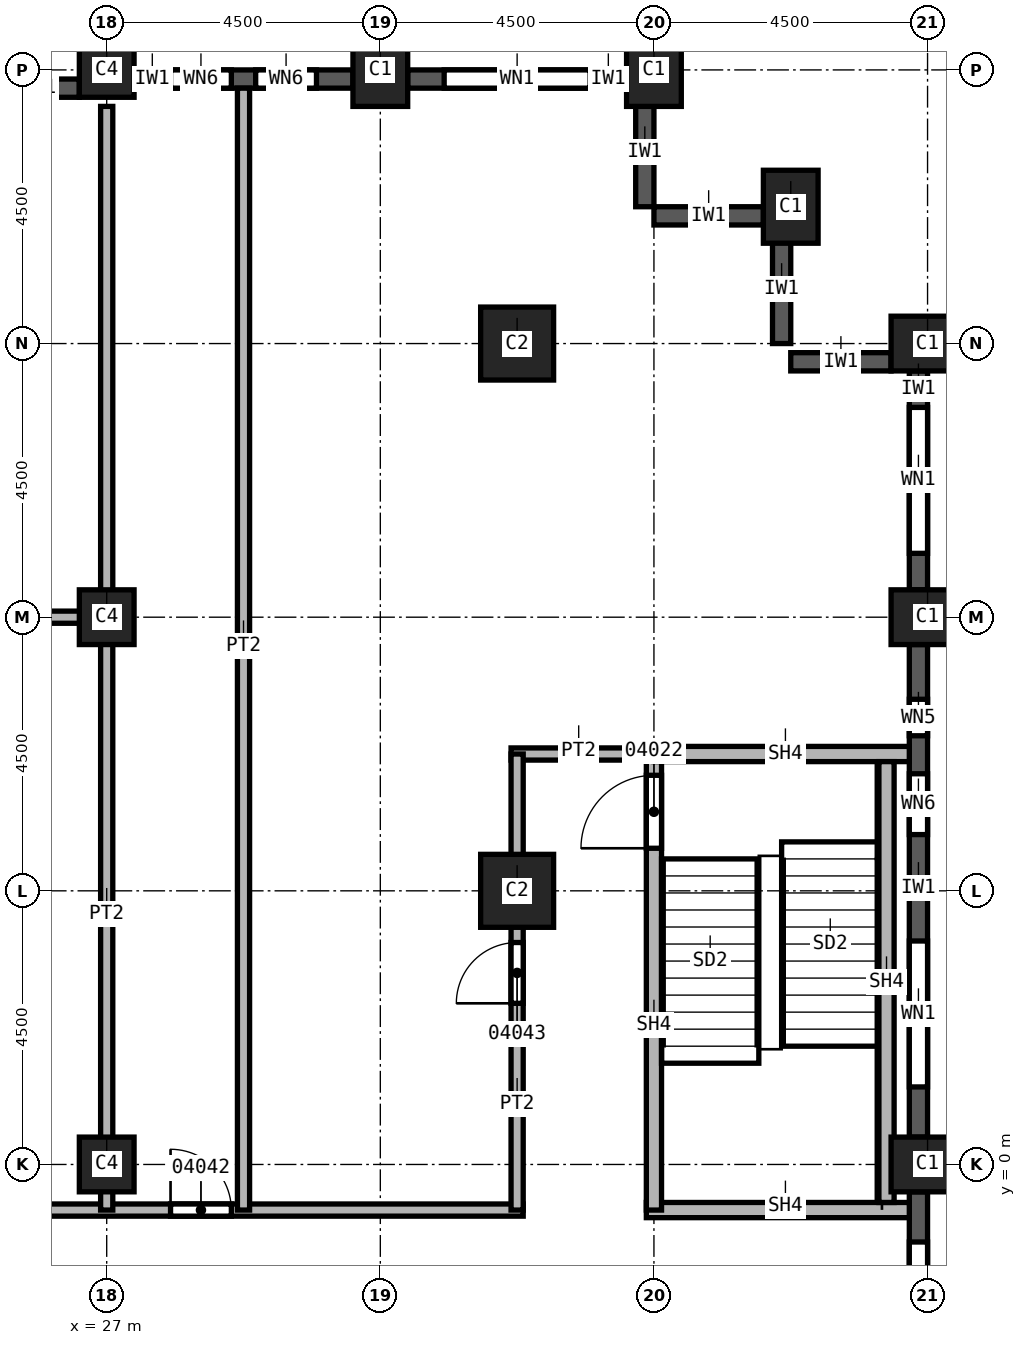
"""IFC4 building model, lengths in metres.
Left out: names, types, materials, properties, quantities, classifications, styles, units other than length and angle.
Written with IfcOpenShell. Run it as: python <this file> out.ifc"""

import sys

from ifc_helpers import new_model, si_unit, direction, frame, frame_2d, origin, origin_2d, place, context, subcontext, project, spatial, rectangle, extrude, element, fill, save


model = new_model("IFC4")
c1 = context("Model", 3, precision=1e-05, world=origin(), true_north=direction((0.0, 1.0)))
c2 = subcontext(c1, "Body", "Model", "MODEL_VIEW")
j1 = project(units=[si_unit("LENGTHUNIT", "METRE"), si_unit("PLANEANGLEUNIT", "RADIAN")], contexts=[c1])
p1 = place(None, origin())
s1 = spatial("IfcSite", under=j1, at=p1, CompositionType="ELEMENT")
p2 = place(p1, origin())
s2 = spatial("IfcBuilding", under=s1, at=p2, CompositionType="ELEMENT")
p3 = place(p2, frame((0.0, 0.0, 104.0)))
s3 = spatial("IfcBuildingStorey", under=s2, at=p3, CompositionType="ELEMENT", Elevation=104.0)
for number, where, z_axis, x_axis in (
    (1, (40.5, 0.0, 0.0), (0.0, 0.0, 1.0), (0.0, 1.0, 0.0)),
    (2, (40.5, 9.0, 0.0), (0.0, 0.0, 1.0), (0.0, 1.0, 0.0)),
    (3, (40.5, 13.5, 0.0), (0.0, 0.0, 1.0), (0.0, 1.0, 0.0)),
    (4, (38.25, 15.75, 0.0), (0.0, 0.0, 1.0), (1.0, 0.0, 0.0)),
    (5, (31.5, 18.0, 0.0), (0.0, 0.0, 1.0), (1.0, 0.0, 0.0)),
    (6, (36.0, 18.0, 0.0), (0.0, 0.0, 1.0), (1.0, 0.0, 0.0)),
):
    element("IfcColumn", number, at=place(p3, frame(where, z_axis=z_axis, x_axis=x_axis)), inside=s3, PredefinedType="COLUMN", context=c2, shape_type="SweptSolid", body=[
        extrude(rectangle(XDim=0.9, YDim=1.2, at=origin_2d()), origin(), (0.0, 0.0, 1.0), 3.7),
    ])
for number, where, z_axis, x_axis in (
    (7, (33.75, 4.5, 0.0), (0.0, 0.0, 1.0), (1.0, 0.0, 0.0)),
    (8, (33.75, 13.5, 0.0), (0.0, 0.0, 1.0), (1.0, 0.0, 0.0)),
):
    element("IfcColumn", number, at=place(p3, frame(where, z_axis=z_axis, x_axis=x_axis)), inside=s3, PredefinedType="COLUMN", context=c2, shape_type="SweptSolid", body=[
        extrude(rectangle(XDim=1.2, YDim=1.2, at=origin_2d()), origin(), (0.0, 0.0, 1.0), 3.7),
    ])
for number, where, z_axis, x_axis in (
    (9, (27.0, 0.0, 0.0), (0.0, 0.0, 1.0), (1.0, 0.0, 0.0)),
    (10, (27.0, 9.0, 0.0), (0.0, 0.0, 1.0), (1.0, 0.0, 0.0)),
    (11, (27.0, 18.0, 0.0), (0.0, 0.0, 1.0), (1.0, 0.0, 0.0)),
):
    element("IfcColumn", number, at=place(p3, frame(where, z_axis=z_axis, x_axis=x_axis)), inside=s3, PredefinedType="COLUMN", context=c2, shape_type="SweptSolid", body=[
        extrude(rectangle(XDim=0.9, YDim=0.9, at=origin_2d()), origin(), (0.0, 0.0, 1.0), 3.7),
    ])
p4 = place(p3, frame((39.9, 13.2, 0.0), z_axis=(0.0, 0.0, 1.0), x_axis=(-1.0, 0.0, 0.0)))
e12 = element("IfcWall", 12, at=p4, inside=s3, PredefinedType="SOLIDWALL", context=c2, shape_type="SweptSolid", body=[
    extrude(rectangle(XDim=1.65, YDim=0.3, at=frame_2d((0.825, 0.0))), origin(), (0.0, 0.0, 1.0), 3.1),
])
for number, where, z_axis, x_axis in (
    (13, (38.1, 15.3, 0.0), (0.0, 0.0, 1.0), (0.0, -1.0, 0.0)),
    (14, (37.8, 15.6, 0.0), (0.0, 0.0, 1.0), (-1.0, 0.0, 0.0)),
    (15, (35.85, 17.55, 0.0), (0.0, 0.0, 1.0), (0.0, -1.0, 0.0)),
):
    element("IfcWall", number, at=place(p3, frame(where, z_axis=z_axis, x_axis=x_axis)), inside=s3, PredefinedType="SOLIDWALL", context=c2, shape_type="SweptSolid", body=[
        extrude(rectangle(XDim=1.8, YDim=0.3, at=frame_2d((0.9, 0.0))), origin(), (0.0, 0.0, 1.0), 3.1),
    ])
p5 = place(p3, frame((40.35, -8.55, 0.0), z_axis=(0.0, 0.0, 1.0), x_axis=(0.0, 1.0, 0.0)))
e16 = element("IfcWall", 16, at=p5, inside=s3, PredefinedType="SOLIDWALL", context=c2, shape_type="SweptSolid", body=[
    extrude(rectangle(XDim=8.1, YDim=0.3, at=frame_2d((4.05, 0.0))), origin(), (0.0, 0.0, 1.0), 3.1),
])
p6 = place(p5, frame((0.825, 0.0, 0.8)))
e17 = element("IfcOpeningElement", 17, at=p6, cuts=e16, PredefinedType="OPENING", context=c2, shape_type="SweptSolid", body=[
    extrude(rectangle(XDim=2.4, YDim=1.95, at=frame_2d((1.2, 0.975))), frame((0.0, 0.15, 0.0), z_axis=(0.0, -1.0, 0.0), x_axis=(1.0, 0.0, 0.0)), (0.0, 0.0, 1.0), 0.3),
])
p7 = place(p5, frame((4.875, 0.0, 0.8)))
e18 = element("IfcOpeningElement", 18, at=p7, cuts=e16, PredefinedType="OPENING", context=c2, shape_type="SweptSolid", body=[
    extrude(rectangle(XDim=2.4, YDim=1.95, at=frame_2d((1.2, 0.975))), frame((0.0, 0.15, 0.0), z_axis=(0.0, -1.0, 0.0), x_axis=(1.0, 0.0, 0.0)), (0.0, 0.0, 1.0), 0.3),
])
p8 = place(p3, frame((40.35, 0.45, 0.0), z_axis=(0.0, 0.0, 1.0), x_axis=(0.0, 1.0, 0.0)))
e19 = element("IfcWall", 19, at=p8, inside=s3, PredefinedType="SOLIDWALL", context=c2, shape_type="SweptSolid", body=[
    extrude(rectangle(XDim=8.1, YDim=0.3, at=frame_2d((4.05, 0.0))), origin(), (0.0, 0.0, 1.0), 3.1),
])
p9 = place(p8, frame((0.825, 0.0, 0.8)))
e20 = element("IfcOpeningElement", 20, at=p9, cuts=e19, PredefinedType="OPENING", context=c2, shape_type="SweptSolid", body=[
    extrude(rectangle(XDim=2.4, YDim=1.95, at=frame_2d((1.2, 0.975))), frame((0.0, 0.15, 0.0), z_axis=(0.0, -1.0, 0.0), x_axis=(1.0, 0.0, 0.0)), (0.0, 0.0, 1.0), 0.3),
])
p10 = place(p8, frame((4.975, 0.0, 0.8)))
e21 = element("IfcOpeningElement", 21, at=p10, cuts=e19, PredefinedType="OPENING", context=c2, shape_type="SweptSolid", body=[
    extrude(rectangle(XDim=1.0, YDim=1.95, at=frame_2d((0.5, 0.975))), frame((0.0, 0.15, 0.0), z_axis=(0.0, -1.0, 0.0), x_axis=(1.0, 0.0, 0.0)), (0.0, 0.0, 1.0), 0.3),
])
p11 = place(p8, frame((6.6, 0.0, 0.8)))
e22 = element("IfcOpeningElement", 22, at=p11, cuts=e19, PredefinedType="OPENING", context=c2, shape_type="SweptSolid", body=[
    extrude(rectangle(XDim=0.6, YDim=1.95, at=frame_2d((0.3, 0.975))), frame((0.0, 0.15, 0.0), z_axis=(0.0, -1.0, 0.0), x_axis=(1.0, 0.0, 0.0)), (0.0, 0.0, 1.0), 0.3),
])
p12 = place(p3, frame((40.35, 9.45, 0.0), z_axis=(0.0, 0.0, 1.0), x_axis=(0.0, 1.0, 0.0)))
e23 = element("IfcWall", 23, at=p12, inside=s3, PredefinedType="SOLIDWALL", context=c2, shape_type="SweptSolid", body=[
    extrude(rectangle(XDim=3.6, YDim=0.3, at=frame_2d((1.8, 0.0))), origin(), (0.0, 0.0, 1.0), 3.1),
])
p13 = place(p12, frame((0.6, 0.0, 0.8)))
e24 = element("IfcOpeningElement", 24, at=p13, cuts=e23, PredefinedType="OPENING", context=c2, shape_type="SweptSolid", body=[
    extrude(rectangle(XDim=2.4, YDim=1.95, at=frame_2d((1.2, 0.975))), frame((0.0, 0.15, 0.0), z_axis=(0.0, -1.0, 0.0), x_axis=(1.0, 0.0, 0.0)), (0.0, 0.0, 1.0), 0.3),
])
p14 = place(p3, frame((35.55, 17.85, 0.0), z_axis=(0.0, 0.0, 1.0), x_axis=(-1.0, 0.0, 0.0)))
e25 = element("IfcWall", 25, at=p14, inside=s3, PredefinedType="SOLIDWALL", context=c2, shape_type="SweptSolid", body=[
    extrude(rectangle(XDim=3.6, YDim=0.3, at=frame_2d((1.8, 0.0))), origin(), (0.0, 0.0, 1.0), 3.1),
])
p15 = place(p14, frame((0.6, 0.0, 0.8)))
e26 = element("IfcOpeningElement", 26, at=p15, cuts=e25, PredefinedType="OPENING", context=c2, shape_type="SweptSolid", body=[
    extrude(rectangle(XDim=2.4, YDim=1.95, at=frame_2d((1.2, 0.975))), frame((0.0, 0.15, 0.0), z_axis=(0.0, -1.0, 0.0), x_axis=(1.0, 0.0, 0.0)), (0.0, 0.0, 1.0), 0.3),
])
p16 = place(p3, frame((31.05, 17.85, 0.0), z_axis=(0.0, 0.0, 1.0), x_axis=(-1.0, 0.0, 0.0)))
e27 = element("IfcWall", 27, at=p16, inside=s3, PredefinedType="SOLIDWALL", context=c2, shape_type="SweptSolid", body=[
    extrude(rectangle(XDim=3.6, YDim=0.3, at=frame_2d((1.8, 0.0))), origin(), (0.0, 0.0, 1.0), 3.1),
])
p17 = place(p16, frame((0.6, 0.0, 0.8)))
e28 = element("IfcOpeningElement", 28, at=p17, cuts=e27, PredefinedType="OPENING", context=c2, shape_type="SweptSolid", body=[
    extrude(rectangle(XDim=1.0, YDim=1.95, at=frame_2d((0.5, 0.975))), frame((0.0, 0.15, 0.0), z_axis=(0.0, -1.0, 0.0), x_axis=(1.0, 0.0, 0.0)), (0.0, 0.0, 1.0), 0.3),
])
p18 = place(p16, frame((2.0, 0.0, 0.8)))
e29 = element("IfcOpeningElement", 29, at=p18, cuts=e27, PredefinedType="OPENING", context=c2, shape_type="SweptSolid", body=[
    extrude(rectangle(XDim=1.0, YDim=1.95, at=frame_2d((0.5, 0.975))), frame((0.0, 0.15, 0.0), z_axis=(0.0, -1.0, 0.0), x_axis=(1.0, 0.0, 0.0)), (0.0, 0.0, 1.0), 0.3),
])
p19 = place(p3, frame((26.55, 17.7, 0.0), z_axis=(0.0, 0.0, 1.0), x_axis=(-1.0, 0.0, 0.0)))
e30 = element("IfcWall", 30, at=p19, inside=s3, PredefinedType="SOLIDWALL", context=c2, shape_type="SweptSolid", body=[
    extrude(rectangle(XDim=1.35, YDim=0.3, at=frame_2d((0.675, 0.0))), origin(), (0.0, 0.0, 1.0), 3.1),
])
p20 = place(p3, frame((15.4, -0.75, 0.0), z_axis=(0.0, 0.0, 1.0), x_axis=(1.0, 0.0, 0.0)))
e31 = element("IfcWall", 31, at=p20, inside=s3, PredefinedType="PARTITIONING", context=c2, shape_type="SweptSolid", body=[
    extrude(rectangle(XDim=18.45, YDim=0.2, at=frame_2d((9.225, 0.0))), origin(), (0.0, 0.0, 1.0), 3.7),
])
p21 = place(p20, frame((3.55, 0.0, 0.0)))
e32 = element("IfcOpeningElement", 32, at=p21, cuts=e31, PredefinedType="OPENING", context=c2, shape_type="SweptSolid", body=[
    extrude(rectangle(XDim=1.0, YDim=2.1, at=frame_2d((0.5, 1.05))), frame((0.0, 0.1, 0.0), z_axis=(0.0, -1.0, 0.0), x_axis=(1.0, 0.0, 0.0)), (0.0, 0.0, 1.0), 0.2),
])
p22 = place(p20, frame((12.65, 0.0, 0.0)))
e33 = element("IfcOpeningElement", 33, at=p22, cuts=e31, PredefinedType="OPENING", context=c2, shape_type="SweptSolid", body=[
    extrude(rectangle(XDim=1.0, YDim=2.1, at=frame_2d((0.5, 1.05))), frame((0.0, 0.1, 0.0), z_axis=(0.0, -1.0, 0.0), x_axis=(1.0, 0.0, 0.0)), (0.0, 0.0, 1.0), 0.2),
])
p23 = place(p3, frame((15.4, 9.0, 0.0), z_axis=(0.0, 0.0, 1.0), x_axis=(1.0, 0.0, 0.0)))
e34 = element("IfcWall", 34, at=p23, inside=s3, PredefinedType="PARTITIONING", context=c2, shape_type="SweptSolid", body=[
    extrude(rectangle(XDim=11.7, YDim=0.2, at=frame_2d((5.85, 0.0))), origin(), (0.0, 0.0, 1.0), 3.7),
])
p24 = place(p3, frame((27.0, 17.4, 0.0), z_axis=(0.0, 0.0, 1.0), x_axis=(0.0, -1.0, 0.0)))
e35 = element("IfcWall", 35, at=p24, inside=s3, PredefinedType="PARTITIONING", context=c2, shape_type="SweptSolid", body=[
    extrude(rectangle(XDim=18.15, YDim=0.2, at=frame_2d((9.075, 0.0))), origin(), (0.0, 0.0, 1.0), 3.7),
])
p25 = place(p3, frame((29.25, 17.7, 0.0), z_axis=(0.0, 0.0, 1.0), x_axis=(0.0, -1.0, 0.0)))
e36 = element("IfcWall", 36, at=p25, inside=s3, PredefinedType="PARTITIONING", context=c2, shape_type="SweptSolid", body=[
    extrude(rectangle(XDim=18.45, YDim=0.2, at=frame_2d((9.225, 0.0))), origin(), (0.0, 0.0, 1.0), 3.7),
])
p26 = place(p3, frame((33.65, 6.75, 0.0), z_axis=(0.0, 0.0, 1.0), x_axis=(1.0, 0.0, 0.0)))
e37 = element("IfcWall", 37, at=p26, inside=s3, PredefinedType="PARTITIONING", context=c2, shape_type="SweptSolid", body=[
    extrude(rectangle(XDim=2.35, YDim=0.2, at=frame_2d((1.175, 0.0))), origin(), (0.0, 0.0, 1.0), 3.7),
])
p27 = place(p3, frame((33.75, -0.75, 0.0), z_axis=(0.0, 0.0, 1.0), x_axis=(0.0, 1.0, 0.0)))
e38 = element("IfcWall", 38, at=p27, inside=s3, PredefinedType="PARTITIONING", context=c2, shape_type="SweptSolid", body=[
    extrude(rectangle(XDim=7.5, YDim=0.2, at=frame_2d((3.75, 0.0))), origin(), (0.0, 0.0, 1.0), 3.7),
])
p28 = place(p27, frame((3.4, 0.0, 0.0)))
e39 = element("IfcOpeningElement", 39, at=p28, cuts=e38, PredefinedType="OPENING", context=c2, shape_type="SweptSolid", body=[
    extrude(rectangle(XDim=1.0, YDim=2.1, at=frame_2d((0.5, 1.05))), frame((0.0, 0.1, 0.0), z_axis=(0.0, -1.0, 0.0), x_axis=(1.0, 0.0, 0.0)), (0.0, 0.0, 1.0), 0.2),
])
p29 = place(p3, frame((35.875, -0.75, 0.0), z_axis=(0.0, 0.0, 1.0), x_axis=(1.0, 0.0, 0.0)))
e40 = element("IfcWall", 40, at=p29, inside=s3, PredefinedType="SOLIDWALL", context=c2, shape_type="SweptSolid", body=[
    extrude(rectangle(XDim=4.325, YDim=0.25, at=frame_2d((2.163, 0.0))), origin(), (0.0, 0.0, 1.0), 3.7),
])
p30 = place(p3, frame((36.0, -0.75, 0.0), z_axis=(0.0, 0.0, 1.0), x_axis=(0.0, 1.0, 0.0)))
e41 = element("IfcWall", 41, at=p30, inside=s3, PredefinedType="SOLIDWALL", context=c2, shape_type="SweptSolid", body=[
    extrude(rectangle(XDim=7.625, YDim=0.25, at=frame_2d((3.812, 0.0))), origin(), (0.0, 0.0, 1.0), 3.7),
])
p31 = place(p30, frame((5.95, 0.0, 0.0)))
e42 = element("IfcOpeningElement", 42, at=p31, cuts=e41, PredefinedType="OPENING", context=c2, shape_type="SweptSolid", body=[
    extrude(rectangle(XDim=1.2, YDim=2.1, at=frame_2d((0.6, 1.05))), frame((0.0, 0.125, 0.0), z_axis=(0.0, -1.0, 0.0), x_axis=(1.0, 0.0, 0.0)), (0.0, 0.0, 1.0), 0.25),
])
p32 = place(p3, frame((36.0, 6.75, 0.0), z_axis=(0.0, 0.0, 1.0), x_axis=(1.0, 0.0, 0.0)))
e43 = element("IfcWall", 43, at=p32, inside=s3, PredefinedType="SOLIDWALL", context=c2, shape_type="SweptSolid", body=[
    extrude(rectangle(XDim=4.2, YDim=0.25, at=frame_2d((2.1, 0.0))), origin(), (0.0, 0.0, 1.0), 3.7),
])
p33 = place(p3, frame((39.825, -0.625, 0.0), z_axis=(0.0, 0.0, 1.0), x_axis=(0.0, 1.0, 0.0)))
e44 = element("IfcWall", 44, at=p33, inside=s3, PredefinedType="SOLIDWALL", context=c2, shape_type="SweptSolid", body=[
    extrude(rectangle(XDim=7.25, YDim=0.25, at=frame_2d((3.625, 0.0))), origin(), (0.0, 0.0, 1.0), 3.7),
])
p34 = place(p7, origin())
e45 = element("IfcWindow", 45, at=p34, inside=s3, PartitioningType="SINGLE_PANEL", PredefinedType="WINDOW", context=c2, shape_type="SweptSolid", body=[
    extrude(rectangle(XDim=2.4, YDim=1.95, at=frame_2d((1.2, 0.975))), frame((0.0, 0.03, 0.0), z_axis=(0.0, -1.0, 0.0), x_axis=(1.0, 0.0, 0.0)), (0.0, 0.0, 1.0), 0.06),
])
fill(e18, e45)
p35 = place(p9, origin())
e46 = element("IfcWindow", 46, at=p35, inside=s3, PartitioningType="SINGLE_PANEL", PredefinedType="WINDOW", context=c2, shape_type="SweptSolid", body=[
    extrude(rectangle(XDim=2.4, YDim=1.95, at=frame_2d((1.2, 0.975))), frame((0.0, 0.03, 0.0), z_axis=(0.0, -1.0, 0.0), x_axis=(1.0, 0.0, 0.0)), (0.0, 0.0, 1.0), 0.06),
])
fill(e20, e46)
p36 = place(p13, origin())
e47 = element("IfcWindow", 47, at=p36, inside=s3, PartitioningType="SINGLE_PANEL", PredefinedType="WINDOW", context=c2, shape_type="SweptSolid", body=[
    extrude(rectangle(XDim=2.4, YDim=1.95, at=frame_2d((1.2, 0.975))), frame((0.0, 0.03, 0.0), z_axis=(0.0, -1.0, 0.0), x_axis=(1.0, 0.0, 0.0)), (0.0, 0.0, 1.0), 0.06),
])
fill(e24, e47)
p37 = place(p15, origin())
e48 = element("IfcWindow", 48, at=p37, inside=s3, PartitioningType="SINGLE_PANEL", PredefinedType="WINDOW", context=c2, shape_type="SweptSolid", body=[
    extrude(rectangle(XDim=2.4, YDim=1.95, at=frame_2d((1.2, 0.975))), frame((0.0, 0.03, 0.0), z_axis=(0.0, -1.0, 0.0), x_axis=(1.0, 0.0, 0.0)), (0.0, 0.0, 1.0), 0.06),
])
fill(e26, e48)
p38 = place(p31, origin())
e49 = element("IfcDoor", 49, at=p38, inside=s3, OperationType="SINGLE_SWING_LEFT", PredefinedType="DOOR", context=c2, shape_type="SweptSolid", body=[
    extrude(rectangle(XDim=1.2, YDim=2.1, at=frame_2d((0.6, 1.05))), frame((0.0, 0.025, 0.0), z_axis=(0.0, -1.0, 0.0), x_axis=(1.0, 0.0, 0.0)), (0.0, 0.0, 1.0), 0.05),
])
fill(e42, e49)
p39 = place(p22, origin())
e50 = element("IfcDoor", 50, at=p39, inside=s3, OperationType="SINGLE_SWING_LEFT", PredefinedType="DOOR", context=c2, shape_type="SweptSolid", body=[
    extrude(rectangle(XDim=1.0, YDim=2.1, at=frame_2d((0.5, 1.05))), frame((0.0, 0.025, 0.0), z_axis=(0.0, -1.0, 0.0), x_axis=(1.0, 0.0, 0.0)), (0.0, 0.0, 1.0), 0.05),
])
fill(e33, e50)
p40 = place(p28, origin())
e51 = element("IfcDoor", 51, at=p40, inside=s3, OperationType="SINGLE_SWING_RIGHT", PredefinedType="DOOR", context=c2, shape_type="SweptSolid", body=[
    extrude(rectangle(XDim=1.0, YDim=2.1, at=frame_2d((0.5, 1.05))), frame((0.0, 0.025, 0.0), z_axis=(0.0, -1.0, 0.0), x_axis=(1.0, 0.0, 0.0)), (0.0, 0.0, 1.0), 0.05),
])
fill(e39, e51)
p41 = place(p10, origin())
e52 = element("IfcWindow", 52, at=p41, inside=s3, PartitioningType="SINGLE_PANEL", PredefinedType="WINDOW", context=c2, shape_type="SweptSolid", body=[
    extrude(rectangle(XDim=1.0, YDim=1.95, at=frame_2d((0.5, 0.975))), frame((0.0, 0.03, 0.0), z_axis=(0.0, -1.0, 0.0), x_axis=(1.0, 0.0, 0.0)), (0.0, 0.0, 1.0), 0.06),
])
fill(e21, e52)
p42 = place(p11, origin())
e53 = element("IfcWindow", 53, at=p42, inside=s3, PartitioningType="SINGLE_PANEL", PredefinedType="WINDOW", context=c2, shape_type="SweptSolid", body=[
    extrude(rectangle(XDim=0.6, YDim=1.95, at=frame_2d((0.3, 0.975))), frame((0.0, 0.03, 0.0), z_axis=(0.0, -1.0, 0.0), x_axis=(1.0, 0.0, 0.0)), (0.0, 0.0, 1.0), 0.06),
])
fill(e22, e53)
p43 = place(p17, origin())
e54 = element("IfcWindow", 54, at=p43, inside=s3, PartitioningType="SINGLE_PANEL", PredefinedType="WINDOW", context=c2, shape_type="SweptSolid", body=[
    extrude(rectangle(XDim=1.0, YDim=1.95, at=frame_2d((0.5, 0.975))), frame((0.0, 0.03, 0.0), z_axis=(0.0, -1.0, 0.0), x_axis=(1.0, 0.0, 0.0)), (0.0, 0.0, 1.0), 0.06),
])
fill(e28, e54)
p44 = place(p18, origin())
e55 = element("IfcWindow", 55, at=p44, inside=s3, PartitioningType="SINGLE_PANEL", PredefinedType="WINDOW", context=c2, shape_type="SweptSolid", body=[
    extrude(rectangle(XDim=1.0, YDim=1.95, at=frame_2d((0.5, 0.975))), frame((0.0, 0.03, 0.0), z_axis=(0.0, -1.0, 0.0), x_axis=(1.0, 0.0, 0.0)), (0.0, 0.0, 1.0), 0.06),
])
fill(e29, e55)
save(model, sys.argv[1])
